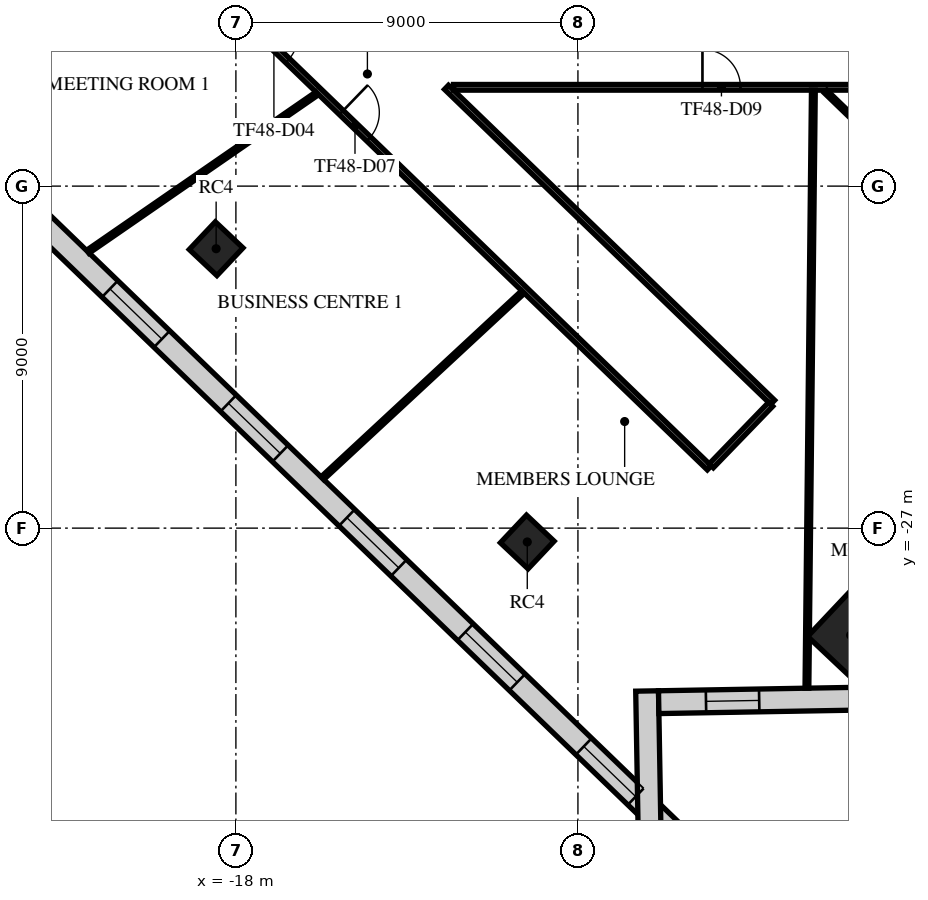
"""IFC4 building model, lengths in metres.
Left out: names, types, materials, properties, quantities, classifications, styles, units other than length and angle.
Written with IfcOpenShell. Run it as: python <this file> out.ifc"""

import sys

from ifc_helpers import new_model, si_unit, direction, frame, frame_2d, origin, origin_2d, place, context, subcontext, project, spatial, rectangle, extrude, element, fill, save


model = new_model("IFC4")
c1 = context("Model", 3, precision=1e-05, world=origin(), true_north=direction((0.0, 1.0)))
c2 = subcontext(c1, "Body", "Model", "MODEL_VIEW")
j1 = project(units=[si_unit("LENGTHUNIT", "METRE"), si_unit("PLANEANGLEUNIT", "RADIAN")], contexts=[c1])
p1 = place(None, origin())
s1 = spatial("IfcSite", under=j1, at=p1, CompositionType="ELEMENT")
p2 = place(p1, origin())
s2 = spatial("IfcBuilding", under=s1, at=p2, CompositionType="ELEMENT")
p3 = place(p2, frame((0.0, 0.0, 205.3)))
s3 = spatial("IfcBuildingStorey", under=s2, at=p3, CompositionType="ELEMENT", Elevation=205.3)
for number, where, z_axis, x_axis in (
    (1, (-18.52, -19.647, 0.0), (0.0, 0.0, 1.0), (0.686, 0.728, 0.0)),
    (2, (-10.333, -27.364, 0.0), (0.0, 0.0, 1.0), (0.686, 0.728, 0.0)),
):
    element("IfcColumn", number, at=place(p3, frame(where, z_axis=z_axis, x_axis=x_axis)), inside=s3, PredefinedType="COLUMN", context=c2, shape_type="SweptSolid", body=[
        extrude(rectangle(XDim=1.0, YDim=1.0, at=origin_2d()), origin(), (0.0, 0.0, 1.0), 4.0),
    ])
p4 = place(p3, frame((-1.825, -29.818, 0.0), z_axis=(0.0, 0.0, 1.0), x_axis=(0.685916152371, 0.727680583715, 0.0)))
e3 = element("IfcColumn", 3, at=p4, inside=s3, PredefinedType="COLUMN", context=c2, shape_type="SweptSolid", body=[
    extrude(rectangle(XDim=1.6, YDim=1.6, at=origin_2d()), origin(), (0.0, 0.0, 1.0), 4.0),
])
p5 = place(p3, frame((-34.658, -7.819, 0.0), z_axis=(0.0, 0.0, 1.0), x_axis=(0.719340729741, -0.694657408034, 0.0)))
e4 = element("IfcWall", 4, at=p5, inside=s3, PredefinedType="STANDARD", context=c2, shape_type="SweptSolid", body=[
    extrude(rectangle(XDim=39.0, YDim=0.6, at=frame_2d((19.5, 0.0))), origin(), (0.0, 0.0, 1.0), 3.62),
])
p6 = place(p5, frame((1.217, 0.0, 0.9)))
e5 = element("IfcOpeningElement", 5, at=p6, cuts=e4, PredefinedType="OPENING", context=c2, shape_type="SweptSolid", body=[
    extrude(rectangle(XDim=1.9, YDim=2.1, at=frame_2d((0.95, 1.05))), frame((0.0, 0.31, 0.0), z_axis=(0.0, -1.0, 0.0), x_axis=(1.0, 0.0, 0.0)), (0.0, 0.0, 1.0), 0.62),
])
p7 = place(p5, frame((5.55, 0.0, 0.9)))
e6 = element("IfcOpeningElement", 6, at=p7, cuts=e4, PredefinedType="OPENING", context=c2, shape_type="SweptSolid", body=[
    extrude(rectangle(XDim=1.9, YDim=2.1, at=frame_2d((0.95, 1.05))), frame((0.0, 0.31, 0.0), z_axis=(0.0, -1.0, 0.0), x_axis=(1.0, 0.0, 0.0)), (0.0, 0.0, 1.0), 0.62),
])
p8 = place(p5, frame((9.883, 0.0, 0.9)))
e7 = element("IfcOpeningElement", 7, at=p8, cuts=e4, PredefinedType="OPENING", context=c2, shape_type="SweptSolid", body=[
    extrude(rectangle(XDim=1.9, YDim=2.1, at=frame_2d((0.95, 1.05))), frame((0.0, 0.31, 0.0), z_axis=(0.0, -1.0, 0.0), x_axis=(1.0, 0.0, 0.0)), (0.0, 0.0, 1.0), 0.62),
])
p9 = place(p5, frame((14.217, 0.0, 0.9)))
e8 = element("IfcOpeningElement", 8, at=p9, cuts=e4, PredefinedType="OPENING", context=c2, shape_type="SweptSolid", body=[
    extrude(rectangle(XDim=1.9, YDim=2.1, at=frame_2d((0.95, 1.05))), frame((0.0, 0.31, 0.0), z_axis=(0.0, -1.0, 0.0), x_axis=(1.0, 0.0, 0.0)), (0.0, 0.0, 1.0), 0.62),
])
p10 = place(p5, frame((18.55, 0.0, 0.9)))
e9 = element("IfcOpeningElement", 9, at=p10, cuts=e4, PredefinedType="OPENING", context=c2, shape_type="SweptSolid", body=[
    extrude(rectangle(XDim=1.9, YDim=2.1, at=frame_2d((0.95, 1.05))), frame((0.0, 0.31, 0.0), z_axis=(0.0, -1.0, 0.0), x_axis=(1.0, 0.0, 0.0)), (0.0, 0.0, 1.0), 0.62),
])
p11 = place(p5, frame((22.883, 0.0, 0.9)))
e10 = element("IfcOpeningElement", 10, at=p11, cuts=e4, PredefinedType="OPENING", context=c2, shape_type="SweptSolid", body=[
    extrude(rectangle(XDim=1.9, YDim=2.1, at=frame_2d((0.95, 1.05))), frame((0.0, 0.31, 0.0), z_axis=(0.0, -1.0, 0.0), x_axis=(1.0, 0.0, 0.0)), (0.0, 0.0, 1.0), 0.62),
])
p12 = place(p5, frame((27.217, 0.0, 0.9)))
e11 = element("IfcOpeningElement", 11, at=p12, cuts=e4, PredefinedType="OPENING", context=c2, shape_type="SweptSolid", body=[
    extrude(rectangle(XDim=1.9, YDim=2.1, at=frame_2d((0.95, 1.05))), frame((0.0, 0.31, 0.0), z_axis=(0.0, -1.0, 0.0), x_axis=(1.0, 0.0, 0.0)), (0.0, 0.0, 1.0), 0.62),
])
p13 = place(p5, frame((31.55, 0.0, 0.9)))
e12 = element("IfcOpeningElement", 12, at=p13, cuts=e4, PredefinedType="OPENING", context=c2, shape_type="SweptSolid", body=[
    extrude(rectangle(XDim=1.9, YDim=2.1, at=frame_2d((0.95, 1.05))), frame((0.0, 0.31, 0.0), z_axis=(0.0, -1.0, 0.0), x_axis=(1.0, 0.0, 0.0)), (0.0, 0.0, 1.0), 0.62),
])
p14 = place(p5, frame((35.883, 0.0, 0.9)))
e13 = element("IfcOpeningElement", 13, at=p14, cuts=e4, PredefinedType="OPENING", context=c2, shape_type="SweptSolid", body=[
    extrude(rectangle(XDim=1.9, YDim=2.1, at=frame_2d((0.95, 1.05))), frame((0.0, 0.31, 0.0), z_axis=(0.0, -1.0, 0.0), x_axis=(1.0, 0.0, 0.0)), (0.0, 0.0, 1.0), 0.62),
])
p15 = place(p3, frame((-7.113, -35.131, 0.0), z_axis=(0.0, 0.0, 1.0), x_axis=(-0.017454332947, 0.999847661527, 0.0)))
e14 = element("IfcWall", 14, at=p15, inside=s3, PredefinedType="STANDARD", context=c2, shape_type="SweptSolid", body=[
    extrude(rectangle(XDim=3.846, YDim=0.6, at=frame_2d((1.923, 0.0))), origin(), (0.0, 0.0, 1.0), 3.62),
])
p16 = place(p3, frame((-6.875, -31.58, 0.0), z_axis=(0.0, 0.0, 1.0), x_axis=(0.999847712186, 0.017451430795, 0.0)))
e15 = element("IfcWall", 15, at=p16, inside=s3, PredefinedType="STANDARD", context=c2, shape_type="SweptSolid", body=[
    extrude(rectangle(XDim=7.778, YDim=0.6, at=frame_2d((3.889, 0.0))), origin(), (0.0, 0.0, 1.0), 3.62),
])
p17 = place(p16, frame((1.244, 0.0, 0.9)))
e16 = element("IfcOpeningElement", 16, at=p17, cuts=e15, PredefinedType="OPENING", context=c2, shape_type="SweptSolid", body=[
    extrude(rectangle(XDim=1.4, YDim=2.1, at=frame_2d((0.7, 1.05))), frame((0.0, 0.31, 0.0), z_axis=(0.0, -1.0, 0.0), x_axis=(1.0, 0.0, 0.0)), (0.0, 0.0, 1.0), 0.62),
])
p18 = place(p3, frame((-25.151, -6.479, 0.0), z_axis=(0.0, 0.0, 1.0), x_axis=(0.719341269489, -0.694656849106, 0.0)))
e17 = element("IfcWall", 17, at=p18, inside=s3, PredefinedType="PARTITIONING", context=c2, shape_type="SweptSolid", body=[
    extrude(rectangle(XDim=27.258, YDim=0.15, at=frame_2d((13.629, 0.0))), origin(), (0.0, 0.0, 1.0), 3.17),
])
p19 = place(p18, frame((3.55, 0.0, 0.0)))
e18 = element("IfcOpeningElement", 18, at=p19, cuts=e17, PredefinedType="OPENING", context=c2, shape_type="SweptSolid", body=[
    extrude(rectangle(XDim=1.0, YDim=2.1, at=frame_2d((0.5, 1.05))), frame((0.0, 0.085, 0.0), z_axis=(0.0, -1.0, 0.0), x_axis=(1.0, 0.0, 0.0)), (0.0, 0.0, 1.0), 0.17),
])
p20 = place(p18, frame((10.832, 0.0, 0.0)))
e19 = element("IfcOpeningElement", 19, at=p20, cuts=e17, PredefinedType="OPENING", context=c2, shape_type="SweptSolid", body=[
    extrude(rectangle(XDim=1.0, YDim=2.1, at=frame_2d((0.5, 1.05))), frame((0.0, 0.085, 0.0), z_axis=(0.0, -1.0, 0.0), x_axis=(1.0, 0.0, 0.0)), (0.0, 0.0, 1.0), 0.17),
])
p21 = place(p18, frame((13.797, 0.0, 0.0)))
e20 = element("IfcOpeningElement", 20, at=p21, cuts=e17, PredefinedType="OPENING", context=c2, shape_type="SweptSolid", body=[
    extrude(rectangle(XDim=1.0, YDim=2.1, at=frame_2d((0.5, 1.05))), frame((0.0, 0.085, 0.0), z_axis=(0.0, -1.0, 0.0), x_axis=(1.0, 0.0, 0.0)), (0.0, 0.0, 1.0), 0.17),
])
p22 = place(p3, frame((-12.459, -15.4, 0.0), z_axis=(0.0, 0.0, 1.0), x_axis=(0.719357740032, -0.694639792883, 0.0)))
e21 = element("IfcWall", 21, at=p22, inside=s3, PredefinedType="PARTITIONING", context=c2, shape_type="SweptSolid", body=[
    extrude(rectangle(XDim=11.931, YDim=0.15, at=frame_2d((5.966, 0.0))), origin(), (0.0, 0.0, 1.0), 3.17),
])
p23 = place(p3, frame((-12.273, -15.4, 0.0), z_axis=(0.0, 0.0, 1.0), x_axis=(1.0, 0.0, 0.0)))
e22 = element("IfcWall", 22, at=p23, inside=s3, PredefinedType="PARTITIONING", context=c2, shape_type="SweptSolid", body=[
    extrude(rectangle(XDim=18.423, YDim=0.15, at=frame_2d((9.212, 0.0))), origin(), (0.0, 0.0, 1.0), 3.17),
])
p24 = place(p23, frame((6.55, 0.0, 0.0)))
e23 = element("IfcOpeningElement", 23, at=p24, cuts=e22, PredefinedType="OPENING", context=c2, shape_type="SweptSolid", body=[
    extrude(rectangle(XDim=1.0, YDim=2.1, at=frame_2d((0.5, 1.05))), frame((0.0, 0.085, 0.0), z_axis=(0.0, -1.0, 0.0), x_axis=(1.0, 0.0, 0.0)), (0.0, 0.0, 1.0), 0.17),
])
p25 = place(p3, frame((-5.491, -25.36, 0.0), z_axis=(0.0, 0.0, 1.0), x_axis=(0.694737811608, 0.719263076435, 0.0)))
e24 = element("IfcWall", 24, at=p25, inside=s3, PredefinedType="PARTITIONING", context=c2, shape_type="SweptSolid", body=[
    extrude(rectangle(XDim=2.25, YDim=0.15, at=frame_2d((1.125, 0.0))), origin(), (0.0, 0.0, 1.0), 3.17),
])
p26 = place(p3, frame((-25.182, -16.55, 0.0), z_axis=(0.0, 0.0, 1.0), x_axis=(0.541323767844, 0.84081423535, 0.0)))
e25 = element("IfcWall", 25, at=p26, inside=s3, PredefinedType="PARTITIONING", context=c2, shape_type="SweptSolid", body=[
    extrude(rectangle(XDim=7.321, YDim=0.1, at=frame_2d((3.661, 0.0))), origin(), (0.0, 0.0, 1.0), 2.97),
])
p27 = place(p3, frame((-21.894, -19.725, 0.0), z_axis=(0.0, 0.0, 1.0), x_axis=(0.822893560883, 0.568195553887, 0.0)))
e26 = element("IfcWall", 26, at=p27, inside=s3, PredefinedType="PARTITIONING", context=c2, shape_type="SweptSolid", body=[
    extrude(rectangle(XDim=7.324, YDim=0.1, at=frame_2d((3.662, 0.0))), origin(), (0.0, 0.0, 1.0), 2.97),
])
p28 = place(p3, frame((-15.722, -25.685, 0.0), z_axis=(0.0, 0.0, 1.0), x_axis=(0.732967408974, 0.680263755747, 0.0)))
e27 = element("IfcWall", 27, at=p28, inside=s3, PredefinedType="PARTITIONING", context=c2, shape_type="SweptSolid", body=[
    extrude(rectangle(XDim=7.199, YDim=0.1, at=frame_2d((3.599, 0.0))), origin(), (0.0, 0.0, 1.0), 2.97),
])
p29 = place(p3, frame((-2.975, -31.21, 0.0), z_axis=(0.0, 0.0, 1.0), x_axis=(0.010798774474, 0.999941691535, 0.0)))
e28 = element("IfcWall", 28, at=p29, inside=s3, PredefinedType="PARTITIONING", context=c2, shape_type="SweptSolid", body=[
    extrude(rectangle(XDim=15.735, YDim=0.1, at=frame_2d((7.868, 0.0))), origin(), (0.0, 0.0, 1.0), 2.97),
])
p30 = place(p3, frame((-2.484, -15.511, 0.0), z_axis=(0.0, 0.0, 1.0), x_axis=(0.719269714203, -0.694730939451, 0.0)))
e29 = element("IfcWall", 29, at=p30, inside=s3, PredefinedType="PARTITIONING", context=c2, shape_type="SweptSolid", body=[
    extrude(rectangle(XDim=7.919, YDim=0.1, at=frame_2d((3.96, 0.0))), origin(), (0.0, 0.0, 1.0), 3.17),
])
p31 = place(p10, origin())
e30 = element("IfcWindow", 30, at=p31, inside=s3, PartitioningType="SINGLE_PANEL", PredefinedType="WINDOW", context=c2, shape_type="SweptSolid", body=[
    extrude(rectangle(XDim=1.9, YDim=2.1, at=frame_2d((0.95, 1.05))), frame((0.0, 0.03, 0.0), z_axis=(0.0, -1.0, 0.0), x_axis=(1.0, 0.0, 0.0)), (0.0, 0.0, 1.0), 0.06),
])
fill(e9, e30)
p32 = place(p11, origin())
e31 = element("IfcWindow", 31, at=p32, inside=s3, PartitioningType="SINGLE_PANEL", PredefinedType="WINDOW", context=c2, shape_type="SweptSolid", body=[
    extrude(rectangle(XDim=1.9, YDim=2.1, at=frame_2d((0.95, 1.05))), frame((0.0, 0.03, 0.0), z_axis=(0.0, -1.0, 0.0), x_axis=(1.0, 0.0, 0.0)), (0.0, 0.0, 1.0), 0.06),
])
fill(e10, e31)
p33 = place(p12, origin())
e32 = element("IfcWindow", 32, at=p33, inside=s3, PartitioningType="SINGLE_PANEL", PredefinedType="WINDOW", context=c2, shape_type="SweptSolid", body=[
    extrude(rectangle(XDim=1.9, YDim=2.1, at=frame_2d((0.95, 1.05))), frame((0.0, 0.03, 0.0), z_axis=(0.0, -1.0, 0.0), x_axis=(1.0, 0.0, 0.0)), (0.0, 0.0, 1.0), 0.06),
])
fill(e11, e32)
p34 = place(p13, origin())
e33 = element("IfcWindow", 33, at=p34, inside=s3, PartitioningType="SINGLE_PANEL", PredefinedType="WINDOW", context=c2, shape_type="SweptSolid", body=[
    extrude(rectangle(XDim=1.9, YDim=2.1, at=frame_2d((0.95, 1.05))), frame((0.0, 0.03, 0.0), z_axis=(0.0, -1.0, 0.0), x_axis=(1.0, 0.0, 0.0)), (0.0, 0.0, 1.0), 0.06),
])
fill(e12, e33)
p35 = place(p14, origin())
e34 = element("IfcWindow", 34, at=p35, inside=s3, PartitioningType="SINGLE_PANEL", PredefinedType="WINDOW", context=c2, shape_type="SweptSolid", body=[
    extrude(rectangle(XDim=1.9, YDim=2.1, at=frame_2d((0.95, 1.05))), frame((0.0, 0.03, 0.0), z_axis=(0.0, -1.0, 0.0), x_axis=(1.0, 0.0, 0.0)), (0.0, 0.0, 1.0), 0.06),
])
fill(e13, e34)
p36 = place(p17, origin())
e35 = element("IfcWindow", 35, at=p36, inside=s3, PartitioningType="SINGLE_PANEL", PredefinedType="WINDOW", context=c2, shape_type="SweptSolid", body=[
    extrude(rectangle(XDim=1.4, YDim=2.1, at=frame_2d((0.7, 1.05))), frame((0.0, 0.03, 0.0), z_axis=(0.0, -1.0, 0.0), x_axis=(1.0, 0.0, 0.0)), (0.0, 0.0, 1.0), 0.06),
])
fill(e16, e35)
p37 = place(p20, frame((1.0, 0.0, 0.0), z_axis=(0.0, 0.0, 1.0), x_axis=(-1.0, 0.0, 0.0)))
e36 = element("IfcDoor", 36, at=p37, inside=s3, OperationType="SINGLE_SWING_RIGHT", PredefinedType="DOOR", context=c2, shape_type="SweptSolid", body=[
    extrude(rectangle(XDim=1.0, YDim=2.1, at=frame_2d((0.5, 1.05))), frame((0.0, 0.025, 0.0), z_axis=(0.0, -1.0, 0.0), x_axis=(1.0, 0.0, 0.0)), (0.0, 0.0, 1.0), 0.05),
])
fill(e19, e36)
p38 = place(p21, frame((1.0, 0.0, 0.0), z_axis=(0.0, 0.0, 1.0), x_axis=(-1.0, 0.0, 0.0)))
e37 = element("IfcDoor", 37, at=p38, inside=s3, OperationType="SINGLE_SWING_RIGHT", PredefinedType="DOOR", context=c2, shape_type="SweptSolid", body=[
    extrude(rectangle(XDim=1.0, YDim=2.1, at=frame_2d((0.5, 1.05))), frame((0.0, 0.025, 0.0), z_axis=(0.0, -1.0, 0.0), x_axis=(1.0, 0.0, 0.0)), (0.0, 0.0, 1.0), 0.05),
])
fill(e20, e37)
p39 = place(p24, frame((1.0, 0.0, 0.0), z_axis=(0.0, 0.0, 1.0), x_axis=(-1.0, 0.0, 0.0)))
e38 = element("IfcDoor", 38, at=p39, inside=s3, OperationType="SINGLE_SWING_LEFT", PredefinedType="DOOR", context=c2, shape_type="SweptSolid", body=[
    extrude(rectangle(XDim=1.0, YDim=2.1, at=frame_2d((0.5, 1.05))), frame((0.0, 0.025, 0.0), z_axis=(0.0, -1.0, 0.0), x_axis=(1.0, 0.0, 0.0)), (0.0, 0.0, 1.0), 0.05),
])
fill(e23, e38)
save(model, sys.argv[1])
